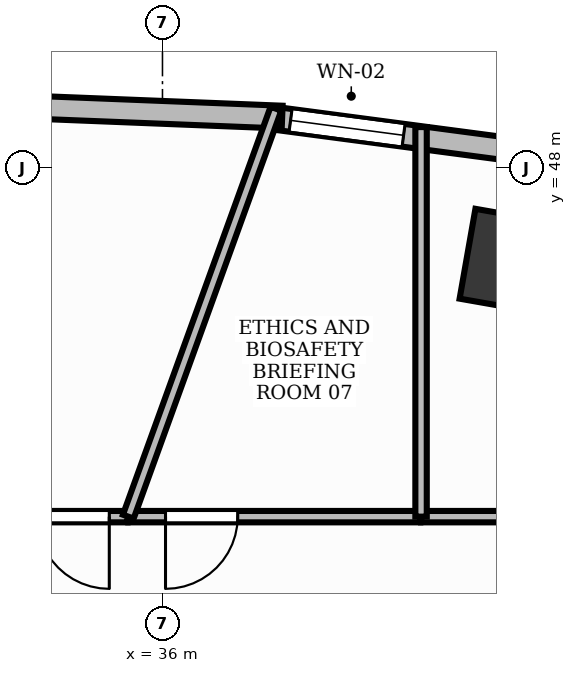
"""IFC4 building model, lengths in metres.
Left out: names, types, materials, properties, quantities, classifications, styles, units other than length and angle.
Written with IfcOpenShell. Run it as: python <this file> out.ifc"""

import sys

from ifc_helpers import new_model, si_unit, direction, frame, frame_2d, origin, origin_2d, place, context, subcontext, project, spatial, rectangle, extrude, element, fill, save


model = new_model("IFC4")
c1 = context("Model", 3, precision=1e-05, world=origin(), true_north=direction((0.0, 1.0)))
c2 = subcontext(c1, "Body", "Model", "MODEL_VIEW")
j1 = project(units=[si_unit("LENGTHUNIT", "METRE"), si_unit("PLANEANGLEUNIT", "RADIAN")], contexts=[c1])
p1 = place(None, origin())
s1 = spatial("IfcSite", under=j1, at=p1, CompositionType="ELEMENT")
p2 = place(p1, origin())
s2 = spatial("IfcBuilding", under=s1, at=p2, CompositionType="ELEMENT")
p3 = place(p2, frame((0.0, 0.0, 123.6)))
s3 = spatial("IfcBuildingStorey", under=s2, at=p3, CompositionType="ELEMENT", Elevation=123.6)
p4 = place(p3, frame((40.604, 46.765, -0.0), z_axis=(0.0, 0.0, 1.0), x_axis=(-0.984868307662, 0.173304404339, 0.0)))
e1 = element("IfcColumn", 1, at=p4, inside=s3, PredefinedType="COLUMN", context=c2, shape_type="SweptSolid", body=[
    extrude(rectangle(XDim=1.2, YDim=1.2, at=origin_2d()), origin(), (0.0, 0.0, 1.0), 3.901),
])
p5 = place(p3, frame((40.964, 48.19, 0.0), z_axis=(0.0, 0.0, 1.0), x_axis=(-0.991369257822, 0.131099178664, 0.0)))
e2 = element("IfcWall", 2, at=p5, inside=s3, PredefinedType="STANDARD", context=c2, shape_type="SweptSolid", body=[
    extrude(rectangle(XDim=3.575, YDim=0.3, at=frame_2d((1.788, 0.0))), origin(), (0.0, 0.0, 1.0), 3.47),
])
p6 = place(p5, frame((1.808, 0.0, 0.95)))
e3 = element("IfcOpeningElement", 3, at=p6, cuts=e2, PredefinedType="OPENING", context=c2, shape_type="SweptSolid", body=[
    extrude(rectangle(XDim=1.5, YDim=1.8, at=frame_2d((0.75, 0.9))), frame((0.0, 0.165, 0.0), z_axis=(0.0, -1.0, 0.0), x_axis=(1.0, 0.0, 0.0)), (0.0, 0.0, 1.0), 0.33),
])
p7 = place(p3, frame((37.574, 48.666, 0.0), z_axis=(0.0, 0.0, 1.0), x_axis=(-0.999212076676, 0.039689114679, 0.0)))
e4 = element("IfcWall", 4, at=p7, inside=s3, PredefinedType="STANDARD", context=c2, shape_type="SweptSolid", body=[
    extrude(rectangle(XDim=3.635, YDim=0.3, at=frame_2d((1.818, 0.0))), origin(), (0.0, 0.0, 1.0), 3.9),
])
p8 = place(p3, frame((44.2, 43.41, 0.0), z_axis=(0.0, 0.0, 1.0), x_axis=(-1.0, 0.0, 0.0)))
e5 = element("IfcWall", 5, at=p8, inside=s3, PredefinedType="PARTITIONING", context=c2, shape_type="SweptSolid", body=[
    extrude(rectangle(XDim=4.798, YDim=0.15, at=frame_2d((2.399, 0.0))), origin(), (0.0, 0.0, 1.0), 2.91),
])
p9 = place(p8, frame((0.24, 0.0, 0.0)))
e6 = element("IfcOpeningElement", 6, at=p9, cuts=e5, PredefinedType="OPENING", context=c2, shape_type="SweptSolid", body=[
    extrude(rectangle(XDim=0.95, YDim=2.15, at=frame_2d((0.475, 1.075))), frame((0.0, 0.09, 0.0), z_axis=(0.0, -1.0, 0.0), x_axis=(1.0, 0.0, 0.0)), (0.0, 0.0, 1.0), 0.18),
])
p10 = place(p3, frame((39.392, 43.41, 0.0), z_axis=(0.0, 0.0, 1.0), x_axis=(-1.0, 0.0, 0.0)))
e7 = element("IfcWall", 7, at=p10, inside=s3, PredefinedType="PARTITIONING", context=c2, shape_type="SweptSolid", body=[
    extrude(rectangle(XDim=3.842, YDim=0.15, at=frame_2d((1.921, 0.0))), origin(), (0.0, 0.0, 1.0), 2.91),
])
p11 = place(p10, frame((2.402, 0.0, 0.0)))
e8 = element("IfcOpeningElement", 8, at=p11, cuts=e7, PredefinedType="OPENING", context=c2, shape_type="SweptSolid", body=[
    extrude(rectangle(XDim=0.95, YDim=2.15, at=frame_2d((0.475, 1.075))), frame((0.0, 0.09, 0.0), z_axis=(0.0, -1.0, 0.0), x_axis=(1.0, 0.0, 0.0)), (0.0, 0.0, 1.0), 0.18),
])
p12 = place(p3, frame((35.54, 43.41, 0.0), z_axis=(0.0, 0.0, 1.0), x_axis=(-1.0, 0.0, 0.0)))
e9 = element("IfcWall", 9, at=p12, inside=s3, PredefinedType="PARTITIONING", context=c2, shape_type="SweptSolid", body=[
    extrude(rectangle(XDim=15.498, YDim=0.15, at=frame_2d((7.749, 0.0))), origin(), (0.0, 0.0, 1.0), 2.91),
])
p13 = place(p12, frame((0.24, 0.0, 0.0)))
e10 = element("IfcOpeningElement", 10, at=p13, cuts=e9, PredefinedType="OPENING", context=c2, shape_type="SweptSolid", body=[
    extrude(rectangle(XDim=0.95, YDim=2.15, at=frame_2d((0.475, 1.075))), frame((0.0, 0.09, 0.0), z_axis=(0.0, -1.0, 0.0), x_axis=(1.0, 0.0, 0.0)), (0.0, 0.0, 1.0), 0.18),
])
p14 = place(p3, frame((39.402, 43.41, 0.0), z_axis=(0.0, 0.0, 1.0), x_axis=(0.0, 1.0, 0.0)))
e11 = element("IfcWall", 11, at=p14, inside=s3, PredefinedType="PARTITIONING", context=c2, shape_type="SweptSolid", body=[
    extrude(rectangle(XDim=5.125, YDim=0.15, at=frame_2d((2.563, 0.0))), origin(), (0.0, 0.0, 1.0), 2.91),
])
p15 = place(p3, frame((35.55, 43.41, 0.0), z_axis=(0.0, 0.0, 1.0), x_axis=(0.340351757169, 0.940298187487, 0.0)))
e12 = element("IfcWall", 12, at=p15, inside=s3, PredefinedType="PARTITIONING", context=c2, shape_type="SweptSolid", body=[
    extrude(rectangle(XDim=5.708, YDim=0.15, at=frame_2d((2.854, 0.0))), origin(), (0.0, 0.0, 1.0), 2.91),
])
p16 = place(p6, origin())
e13 = element("IfcWindow", 13, at=p16, inside=s3, PartitioningType="DOUBLE_PANEL_VERTICAL", PredefinedType="WINDOW", context=c2, shape_type="SweptSolid", body=[
    extrude(rectangle(XDim=1.5, YDim=1.8, at=frame_2d((0.75, 0.9))), frame((0.0, 0.03, 0.0), z_axis=(0.0, -1.0, 0.0), x_axis=(1.0, 0.0, 0.0)), (0.0, 0.0, 1.0), 0.06),
])
fill(e3, e13)
p17 = place(p11, origin())
e14 = element("IfcDoor", 14, at=p17, inside=s3, OperationType="SINGLE_SWING_RIGHT", PredefinedType="DOOR", context=c2, shape_type="SweptSolid", body=[
    extrude(rectangle(XDim=0.95, YDim=2.15, at=frame_2d((0.475, 1.075))), frame((0.0, 0.025, 0.0), z_axis=(0.0, -1.0, 0.0), x_axis=(1.0, 0.0, 0.0)), (0.0, 0.0, 1.0), 0.05),
])
fill(e8, e14)
p18 = place(p13, origin())
e15 = element("IfcDoor", 15, at=p18, inside=s3, OperationType="SINGLE_SWING_LEFT", PredefinedType="DOOR", context=c2, shape_type="SweptSolid", body=[
    extrude(rectangle(XDim=0.95, YDim=2.15, at=frame_2d((0.475, 1.075))), frame((0.0, 0.025, 0.0), z_axis=(0.0, -1.0, 0.0), x_axis=(1.0, 0.0, 0.0)), (0.0, 0.0, 1.0), 0.05),
])
fill(e10, e15)
save(model, sys.argv[1])
